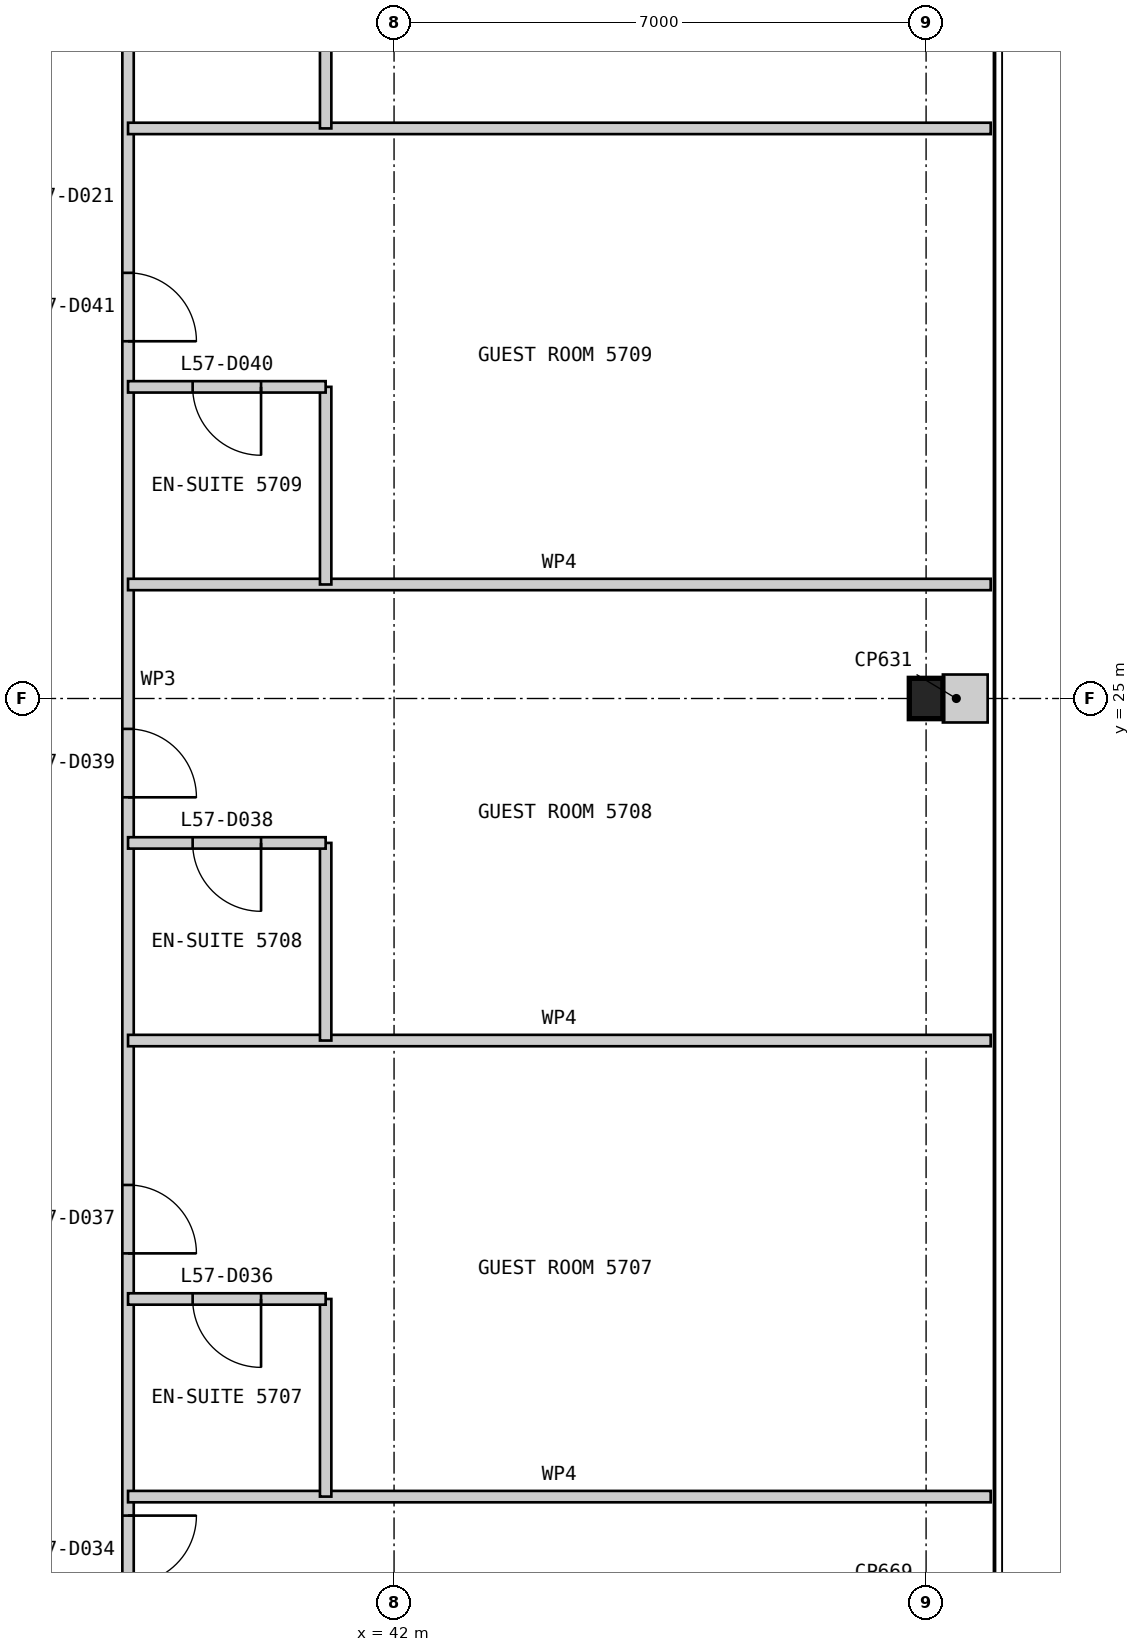
"""IFC4 building model, lengths in metres.
Left out: names, types, materials, properties, quantities, classifications, styles, units other than length and angle.
Written with IfcOpenShell. Run it as: python <this file> out.ifc"""

import sys

from ifc_helpers import new_model, si_unit, direction, frame, frame_2d, origin, origin_2d, place, context, subcontext, project, spatial, rectangle, i_section, extrude, element, fill, save


model = new_model("IFC4")
c1 = context("Model", 3, precision=1e-05, world=origin(), true_north=direction((0.0, 1.0)))
c2 = subcontext(c1, "Body", "Model", "MODEL_VIEW")
j1 = project(units=[si_unit("LENGTHUNIT", "METRE"), si_unit("PLANEANGLEUNIT", "RADIAN")], contexts=[c1])
p1 = place(None, origin())
s1 = spatial("IfcSite", under=j1, at=p1, CompositionType="ELEMENT")
p2 = place(p1, origin())
s2 = spatial("IfcBuilding", under=s1, at=p2, CompositionType="ELEMENT")
p3 = place(p2, frame((0.0, 0.0, 245.8)))
s3 = spatial("IfcBuildingStorey", under=s2, at=p3, CompositionType="ELEMENT", Elevation=245.8)
p4 = place(p3, frame((49.0, 25.0, 0.0), z_axis=(0.0, 0.0, 1.0), x_axis=(1.0, 0.0, 0.0)))
e1 = element("IfcColumn", 1, at=p4, inside=s3, PredefinedType="COLUMN", context=c2, shape_type="SweptSolid", body=[
    extrude(i_section(OverallWidth=0.442, OverallDepth=0.531, WebThickness=0.066, FlangeThickness=0.106, at=origin_2d()), origin(), (0.0, 0.0, 1.0), 3.4),
])
p5 = place(p3, frame((38.5, 11.5, 0.0), z_axis=(0.0, 0.0, 1.0), x_axis=(0.0, 1.0, 0.0)))
e2 = element("IfcWall", 2, at=p5, inside=s3, PredefinedType="PARTITIONING", context=c2, shape_type="SweptSolid", body=[
    extrude(rectangle(XDim=27.0, YDim=0.15, at=frame_2d((13.5, 0.0))), origin(), (0.0, 0.0, 1.0), 3.25),
])
p6 = place(p5, frame((1.85, 0.0, 0.0)))
e3 = element("IfcOpeningElement", 3, at=p6, cuts=e2, PredefinedType="OPENING", context=c2, shape_type="SweptSolid", body=[
    extrude(rectangle(XDim=0.9, YDim=2.1, at=frame_2d((0.45, 1.05))), frame((0.0, 0.085, 0.0), z_axis=(0.0, -1.0, 0.0), x_axis=(1.0, 0.0, 0.0)), (0.0, 0.0, 1.0), 0.17),
])
p7 = place(p5, frame((6.2, 0.0, 0.0)))
e4 = element("IfcOpeningElement", 4, at=p7, cuts=e2, PredefinedType="OPENING", context=c2, shape_type="SweptSolid", body=[
    extrude(rectangle(XDim=0.9, YDim=2.1, at=frame_2d((0.45, 1.05))), frame((0.0, 0.085, 0.0), z_axis=(0.0, -1.0, 0.0), x_axis=(1.0, 0.0, 0.0)), (0.0, 0.0, 1.0), 0.17),
])
p8 = place(p5, frame((12.2, 0.0, 0.0)))
e5 = element("IfcOpeningElement", 5, at=p8, cuts=e2, PredefinedType="OPENING", context=c2, shape_type="SweptSolid", body=[
    extrude(rectangle(XDim=0.9, YDim=2.1, at=frame_2d((0.45, 1.05))), frame((0.0, 0.085, 0.0), z_axis=(0.0, -1.0, 0.0), x_axis=(1.0, 0.0, 0.0)), (0.0, 0.0, 1.0), 0.17),
])
p9 = place(p5, frame((18.2, 0.0, 0.0)))
e6 = element("IfcOpeningElement", 6, at=p9, cuts=e2, PredefinedType="OPENING", context=c2, shape_type="SweptSolid", body=[
    extrude(rectangle(XDim=0.9, YDim=2.1, at=frame_2d((0.45, 1.05))), frame((0.0, 0.085, 0.0), z_axis=(0.0, -1.0, 0.0), x_axis=(1.0, 0.0, 0.0)), (0.0, 0.0, 1.0), 0.17),
])
p10 = place(p5, frame((24.2, 0.0, 0.0)))
e7 = element("IfcOpeningElement", 7, at=p10, cuts=e2, PredefinedType="OPENING", context=c2, shape_type="SweptSolid", body=[
    extrude(rectangle(XDim=0.9, YDim=2.1, at=frame_2d((0.45, 1.05))), frame((0.0, 0.085, 0.0), z_axis=(0.0, -1.0, 0.0), x_axis=(1.0, 0.0, 0.0)), (0.0, 0.0, 1.0), 0.17),
])
p11 = place(p3, frame((49.85, 14.5, 0.0), z_axis=(0.0, 0.0, 1.0), x_axis=(-1.0, 0.0, 0.0)))
e8 = element("IfcWall", 8, at=p11, inside=s3, PredefinedType="PARTITIONING", context=c2, shape_type="SweptSolid", body=[
    extrude(rectangle(XDim=11.35, YDim=0.15, at=frame_2d((5.675, 0.0))), origin(), (0.0, 0.0, 1.0), 3.25),
])
p12 = place(p3, frame((41.1, 14.5, 0.0), z_axis=(0.0, 0.0, 1.0), x_axis=(0.0, 1.0, 0.0)))
e9 = element("IfcWall", 9, at=p12, inside=s3, PredefinedType="PARTITIONING", context=c2, shape_type="SweptSolid", body=[
    extrude(rectangle(XDim=2.6, YDim=0.15, at=frame_2d((1.3, 0.0))), origin(), (0.0, 0.0, 1.0), 3.25),
])
p13 = place(p3, frame((41.1, 17.1, 0.0), z_axis=(0.0, 0.0, 1.0), x_axis=(-1.0, 0.0, 0.0)))
e10 = element("IfcWall", 10, at=p13, inside=s3, PredefinedType="PARTITIONING", context=c2, shape_type="SweptSolid", body=[
    extrude(rectangle(XDim=2.6, YDim=0.15, at=frame_2d((1.3, 0.0))), origin(), (0.0, 0.0, 1.0), 3.25),
])
p14 = place(p13, frame((0.85, 0.0, 0.0)))
e11 = element("IfcOpeningElement", 11, at=p14, cuts=e10, PredefinedType="OPENING", context=c2, shape_type="SweptSolid", body=[
    extrude(rectangle(XDim=0.9, YDim=2.1, at=frame_2d((0.45, 1.05))), frame((0.0, 0.085, 0.0), z_axis=(0.0, -1.0, 0.0), x_axis=(1.0, 0.0, 0.0)), (0.0, 0.0, 1.0), 0.17),
])
p15 = place(p3, frame((49.85, 20.5, 0.0), z_axis=(0.0, 0.0, 1.0), x_axis=(-1.0, 0.0, 0.0)))
e12 = element("IfcWall", 12, at=p15, inside=s3, PredefinedType="PARTITIONING", context=c2, shape_type="SweptSolid", body=[
    extrude(rectangle(XDim=11.35, YDim=0.15, at=frame_2d((5.675, 0.0))), origin(), (0.0, 0.0, 1.0), 3.25),
])
p16 = place(p3, frame((41.1, 20.5, 0.0), z_axis=(0.0, 0.0, 1.0), x_axis=(0.0, 1.0, 0.0)))
e13 = element("IfcWall", 13, at=p16, inside=s3, PredefinedType="PARTITIONING", context=c2, shape_type="SweptSolid", body=[
    extrude(rectangle(XDim=2.6, YDim=0.15, at=frame_2d((1.3, 0.0))), origin(), (0.0, 0.0, 1.0), 3.25),
])
p17 = place(p3, frame((41.1, 23.1, 0.0), z_axis=(0.0, 0.0, 1.0), x_axis=(-1.0, 0.0, 0.0)))
e14 = element("IfcWall", 14, at=p17, inside=s3, PredefinedType="PARTITIONING", context=c2, shape_type="SweptSolid", body=[
    extrude(rectangle(XDim=2.6, YDim=0.15, at=frame_2d((1.3, 0.0))), origin(), (0.0, 0.0, 1.0), 3.25),
])
p18 = place(p17, frame((0.85, 0.0, 0.0)))
e15 = element("IfcOpeningElement", 15, at=p18, cuts=e14, PredefinedType="OPENING", context=c2, shape_type="SweptSolid", body=[
    extrude(rectangle(XDim=0.9, YDim=2.1, at=frame_2d((0.45, 1.05))), frame((0.0, 0.085, 0.0), z_axis=(0.0, -1.0, 0.0), x_axis=(1.0, 0.0, 0.0)), (0.0, 0.0, 1.0), 0.17),
])
p19 = place(p3, frame((49.85, 26.5, 0.0), z_axis=(0.0, 0.0, 1.0), x_axis=(-1.0, 0.0, 0.0)))
e16 = element("IfcWall", 16, at=p19, inside=s3, PredefinedType="PARTITIONING", context=c2, shape_type="SweptSolid", body=[
    extrude(rectangle(XDim=11.35, YDim=0.15, at=frame_2d((5.675, 0.0))), origin(), (0.0, 0.0, 1.0), 3.25),
])
p20 = place(p3, frame((41.1, 26.5, 0.0), z_axis=(0.0, 0.0, 1.0), x_axis=(0.0, 1.0, 0.0)))
e17 = element("IfcWall", 17, at=p20, inside=s3, PredefinedType="PARTITIONING", context=c2, shape_type="SweptSolid", body=[
    extrude(rectangle(XDim=2.6, YDim=0.15, at=frame_2d((1.3, 0.0))), origin(), (0.0, 0.0, 1.0), 3.25),
])
p21 = place(p3, frame((41.1, 29.1, 0.0), z_axis=(0.0, 0.0, 1.0), x_axis=(-1.0, 0.0, 0.0)))
e18 = element("IfcWall", 18, at=p21, inside=s3, PredefinedType="PARTITIONING", context=c2, shape_type="SweptSolid", body=[
    extrude(rectangle(XDim=2.6, YDim=0.15, at=frame_2d((1.3, 0.0))), origin(), (0.0, 0.0, 1.0), 3.25),
])
p22 = place(p21, frame((0.85, 0.0, 0.0)))
e19 = element("IfcOpeningElement", 19, at=p22, cuts=e18, PredefinedType="OPENING", context=c2, shape_type="SweptSolid", body=[
    extrude(rectangle(XDim=0.9, YDim=2.1, at=frame_2d((0.45, 1.05))), frame((0.0, 0.085, 0.0), z_axis=(0.0, -1.0, 0.0), x_axis=(1.0, 0.0, 0.0)), (0.0, 0.0, 1.0), 0.17),
])
p23 = place(p3, frame((49.85, 32.5, 0.0), z_axis=(0.0, 0.0, 1.0), x_axis=(-1.0, 0.0, 0.0)))
e20 = element("IfcWall", 20, at=p23, inside=s3, PredefinedType="PARTITIONING", context=c2, shape_type="SweptSolid", body=[
    extrude(rectangle(XDim=11.35, YDim=0.15, at=frame_2d((5.675, 0.0))), origin(), (0.0, 0.0, 1.0), 3.25),
])
p24 = place(p3, frame((41.1, 32.5, 0.0), z_axis=(0.0, 0.0, 1.0), x_axis=(0.0, 1.0, 0.0)))
e21 = element("IfcWall", 21, at=p24, inside=s3, PredefinedType="PARTITIONING", context=c2, shape_type="SweptSolid", body=[
    extrude(rectangle(XDim=2.6, YDim=0.15, at=frame_2d((1.3, 0.0))), origin(), (0.0, 0.0, 1.0), 3.25),
])
p25 = place(p3, frame((49.81, 25.0, 0.0), z_axis=(0.0, 0.0, 1.0), x_axis=(-1.0, 0.0, 0.0)))
e22 = element("IfcWall", 22, at=p25, inside=s3, PredefinedType="PARTITIONING", context=c2, shape_type="SweptSolid", body=[
    extrude(rectangle(XDim=0.589, YDim=0.631, at=frame_2d((0.294, 0.0))), origin(), (0.0, 0.0, 1.0), 3.25),
])
p26 = place(p6, frame((0.9, 0.0, 0.0), z_axis=(0.0, 0.0, 1.0), x_axis=(-1.0, 0.0, 0.0)))
e23 = element("IfcDoor", 23, at=p26, inside=s3, OperationType="SINGLE_SWING_LEFT", PredefinedType="DOOR", context=c2, shape_type="SweptSolid", body=[
    extrude(rectangle(XDim=0.9, YDim=2.1, at=frame_2d((0.45, 1.05))), frame((0.0, 0.025, 0.0), z_axis=(0.0, -1.0, 0.0), x_axis=(1.0, 0.0, 0.0)), (0.0, 0.0, 1.0), 0.05),
])
fill(e3, e23)
p27 = place(p14, origin())
e24 = element("IfcDoor", 24, at=p27, inside=s3, OperationType="SINGLE_SWING_LEFT", PredefinedType="DOOR", context=c2, shape_type="SweptSolid", body=[
    extrude(rectangle(XDim=0.9, YDim=2.1, at=frame_2d((0.45, 1.05))), frame((0.0, 0.025, 0.0), z_axis=(0.0, -1.0, 0.0), x_axis=(1.0, 0.0, 0.0)), (0.0, 0.0, 1.0), 0.05),
])
fill(e11, e24)
p28 = place(p7, frame((0.9, 0.0, 0.0), z_axis=(0.0, 0.0, 1.0), x_axis=(-1.0, 0.0, 0.0)))
e25 = element("IfcDoor", 25, at=p28, inside=s3, OperationType="SINGLE_SWING_RIGHT", PredefinedType="DOOR", context=c2, shape_type="SweptSolid", body=[
    extrude(rectangle(XDim=0.9, YDim=2.1, at=frame_2d((0.45, 1.05))), frame((0.0, 0.025, 0.0), z_axis=(0.0, -1.0, 0.0), x_axis=(1.0, 0.0, 0.0)), (0.0, 0.0, 1.0), 0.05),
])
fill(e4, e25)
p29 = place(p18, origin())
e26 = element("IfcDoor", 26, at=p29, inside=s3, OperationType="SINGLE_SWING_LEFT", PredefinedType="DOOR", context=c2, shape_type="SweptSolid", body=[
    extrude(rectangle(XDim=0.9, YDim=2.1, at=frame_2d((0.45, 1.05))), frame((0.0, 0.025, 0.0), z_axis=(0.0, -1.0, 0.0), x_axis=(1.0, 0.0, 0.0)), (0.0, 0.0, 1.0), 0.05),
])
fill(e15, e26)
p30 = place(p8, frame((0.9, 0.0, 0.0), z_axis=(0.0, 0.0, 1.0), x_axis=(-1.0, 0.0, 0.0)))
e27 = element("IfcDoor", 27, at=p30, inside=s3, OperationType="SINGLE_SWING_RIGHT", PredefinedType="DOOR", context=c2, shape_type="SweptSolid", body=[
    extrude(rectangle(XDim=0.9, YDim=2.1, at=frame_2d((0.45, 1.05))), frame((0.0, 0.025, 0.0), z_axis=(0.0, -1.0, 0.0), x_axis=(1.0, 0.0, 0.0)), (0.0, 0.0, 1.0), 0.05),
])
fill(e5, e27)
p31 = place(p22, origin())
e28 = element("IfcDoor", 28, at=p31, inside=s3, OperationType="SINGLE_SWING_LEFT", PredefinedType="DOOR", context=c2, shape_type="SweptSolid", body=[
    extrude(rectangle(XDim=0.9, YDim=2.1, at=frame_2d((0.45, 1.05))), frame((0.0, 0.025, 0.0), z_axis=(0.0, -1.0, 0.0), x_axis=(1.0, 0.0, 0.0)), (0.0, 0.0, 1.0), 0.05),
])
fill(e19, e28)
p32 = place(p9, frame((0.9, 0.0, 0.0), z_axis=(0.0, 0.0, 1.0), x_axis=(-1.0, 0.0, 0.0)))
e29 = element("IfcDoor", 29, at=p32, inside=s3, OperationType="SINGLE_SWING_RIGHT", PredefinedType="DOOR", context=c2, shape_type="SweptSolid", body=[
    extrude(rectangle(XDim=0.9, YDim=2.1, at=frame_2d((0.45, 1.05))), frame((0.0, 0.025, 0.0), z_axis=(0.0, -1.0, 0.0), x_axis=(1.0, 0.0, 0.0)), (0.0, 0.0, 1.0), 0.05),
])
fill(e6, e29)
save(model, sys.argv[1])
